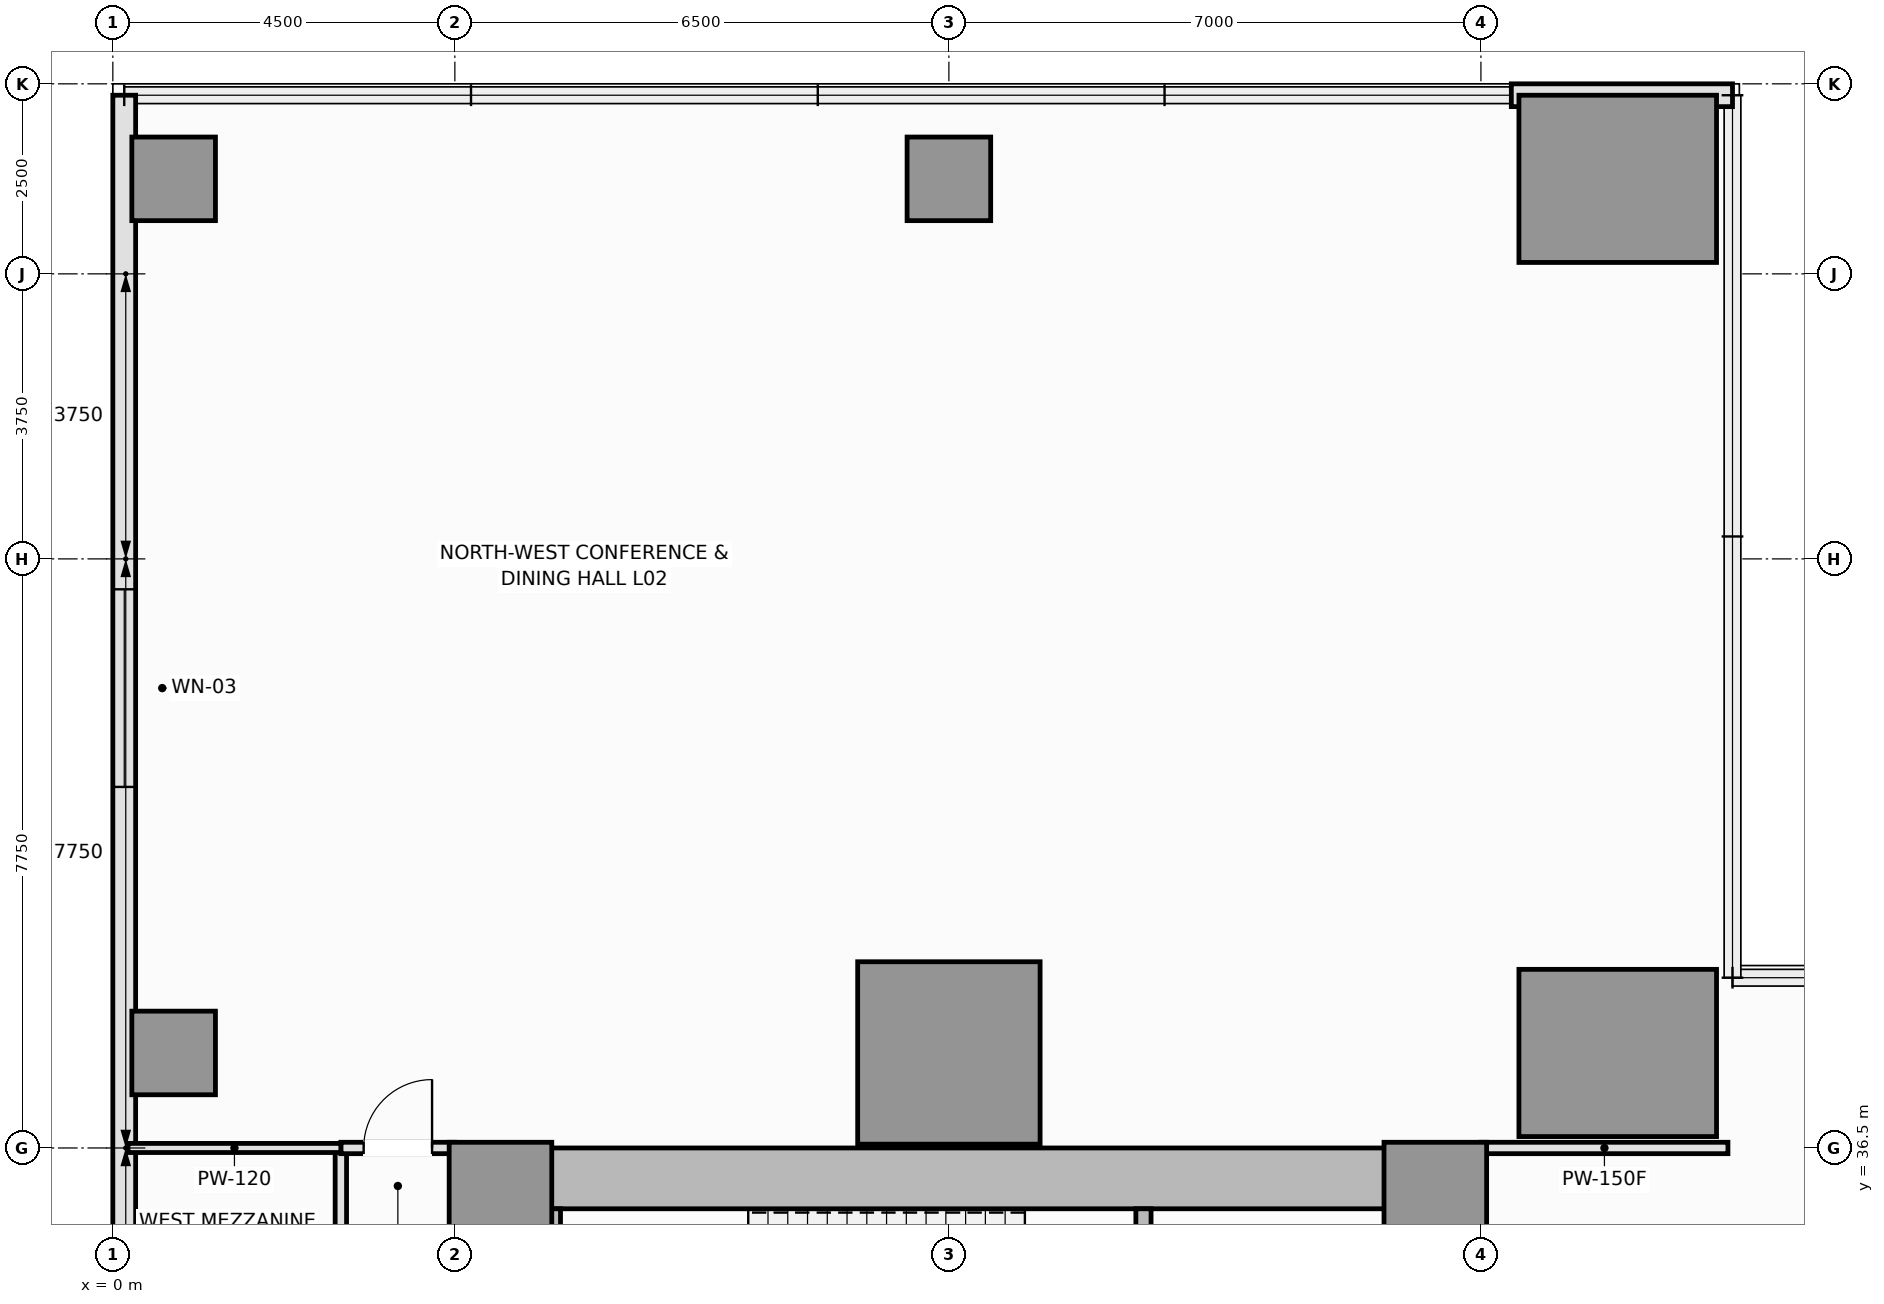
"""IFC4 building model, lengths in metres.
Left out: names, types, materials, properties, quantities, classifications, styles, units other than length and angle.
Written with IfcOpenShell. Run it as: python <this file> out.ifc"""

import sys

from ifc_helpers import new_model, si_unit, direction, frame, frame_2d, origin, origin_2d, place, context, subcontext, project, spatial, rectangle, extrude, element, fill, save


model = new_model("IFC4")
c1 = context("Model", 3, precision=1e-05, world=origin(), true_north=direction((0.0, 1.0)))
c2 = subcontext(c1, "Body", "Model", "MODEL_VIEW")
j1 = project(units=[si_unit("LENGTHUNIT", "METRE"), si_unit("PLANEANGLEUNIT", "RADIAN")], contexts=[c1])
p1 = place(None, origin())
s1 = spatial("IfcSite", under=j1, at=p1, CompositionType="ELEMENT")
p2 = place(p1, origin())
s2 = spatial("IfcBuilding", under=s1, at=p2, CompositionType="ELEMENT")
p3 = place(p2, frame((0.0, 0.0, 10.8)))
s3 = spatial("IfcBuildingStorey", under=s2, at=p3, CompositionType="ELEMENT", Elevation=10.8)
p4 = place(p3, frame((4.5, 36.1, 0.0), z_axis=(0.0, 0.0, 1.0), x_axis=(1.0, 0.0, 0.0)))
e1 = element("IfcWall", 1, at=p4, inside=s3, PredefinedType="SHEAR", context=c2, shape_type="SweptSolid", body=[
    extrude(rectangle(XDim=13.5, YDim=0.8, at=frame_2d((6.75, 0.0))), origin(), (0.0, 0.0, 1.0), 4.8),
])
p5 = place(p3, frame((4.9, 14.8, 0.0), z_axis=(0.0, 0.0, 1.0), x_axis=(0.0, 1.0, 0.0)))
e2 = element("IfcWall", 2, at=p5, inside=s3, PredefinedType="SHEAR", context=c2, shape_type="SweptSolid", body=[
    extrude(rectangle(XDim=20.9, YDim=0.8, at=frame_2d((10.45, 0.0))), origin(), (0.0, 0.0, 1.0), 4.8),
])
p6 = place(p3, frame((17.6, 27.05, 0.0), z_axis=(0.0, 0.0, 1.0), x_axis=(0.0, 1.0, 0.0)))
e3 = element("IfcWall", 3, at=p6, inside=s3, PredefinedType="SHEAR", context=c2, shape_type="SweptSolid", body=[
    extrude(rectangle(XDim=8.65, YDim=0.8, at=frame_2d((4.325, 0.0))), origin(), (0.0, 0.0, 1.0), 4.8),
])
p7 = place(p6, frame((3.45, 0.0, 0.0)))
e4 = element("IfcOpeningElement", 4, at=p7, cuts=e3, PredefinedType="OPENING", context=c2, shape_type="SweptSolid", body=[
    extrude(rectangle(XDim=1.1, YDim=2.15, at=frame_2d((0.55, 1.075))), frame((0.0, 0.41, 0.0), z_axis=(0.0, -1.0, 0.0), x_axis=(1.0, 0.0, 0.0)), (0.0, 0.0, 1.0), 0.82),
])
for number, where, z_axis, x_axis in (
    (5, (5.1, 35.9, 0.0), (0.0, 0.0, 1.0), (1.0, 0.0, 0.0)),
    (6, (17.4, 35.9, 0.0), (0.0, 0.0, 1.0), (1.0, 0.0, 0.0)),
):
    element("IfcColumn", number, at=place(p3, frame(where, z_axis=z_axis, x_axis=x_axis)), inside=s3, PredefinedType="PILASTER", context=c2, shape_type="SweptSolid", body=[
        extrude(rectangle(XDim=1.35, YDim=1.35, at=origin_2d()), origin(), (0.0, 0.0, 1.0), 4.8),
    ])
p8 = place(p3, frame((11.0, 37.75, 0.0), z_axis=(0.0, 0.0, 1.0), x_axis=(1.0, 0.0, 0.0)))
e7 = element("IfcColumn", 7, at=p8, inside=s3, PredefinedType="COLUMN", context=c2, shape_type="SweptSolid", body=[
    extrude(rectangle(XDim=2.4, YDim=2.4, at=origin_2d()), origin(), (0.0, 0.0, 1.0), 4.8),
])
for number, where, z_axis, x_axis in (
    (8, (19.8, 37.75, 0.0), (0.0, 0.0, 1.0), (1.0, 0.0, 0.0)),
    (9, (19.8, 49.25, 0.0), (0.0, 0.0, 1.0), (1.0, 0.0, 0.0)),
):
    element("IfcColumn", number, at=place(p3, frame(where, z_axis=z_axis, x_axis=x_axis)), inside=s3, PredefinedType="COLUMN", context=c2, shape_type="SweptSolid", body=[
        extrude(rectangle(XDim=2.6, YDim=2.2, at=origin_2d()), origin(), (0.0, 0.0, 1.0), 4.8),
    ])
for number, where, z_axis, x_axis in (
    (10, (0.8, 37.75, 0.0), (0.0, 0.0, 1.0), (1.0, 0.0, 0.0)),
    (11, (0.8, 49.25, 0.0), (0.0, 0.0, 1.0), (1.0, 0.0, 0.0)),
    (12, (11.0, 49.25, 0.0), (0.0, 0.0, 1.0), (1.0, 0.0, 0.0)),
):
    element("IfcColumn", number, at=place(p3, frame(where, z_axis=z_axis, x_axis=x_axis)), inside=s3, PredefinedType="COLUMN", context=c2, shape_type="SweptSolid", body=[
        extrude(rectangle(XDim=1.1, YDim=1.1, at=origin_2d()), origin(), (0.0, 0.0, 1.0), 4.8),
    ])
p9 = place(p3, frame((0.15, 50.35, 0.0), z_axis=(0.0, 0.0, 1.0), x_axis=(0.0, -1.0, 0.0)))
e13 = element("IfcWall", 13, at=p9, inside=s3, PredefinedType="SOLIDWALL", context=c2, shape_type="SweptSolid", body=[
    extrude(rectangle(XDim=50.2, YDim=0.3, at=frame_2d((25.1, 0.0))), origin(), (0.0, 0.0, 1.0), 4.6),
])
p10 = place(p9, frame((6.5, 0.0, 0.9)))
e14 = element("IfcOpeningElement", 14, at=p10, cuts=e13, PredefinedType="OPENING", context=c2, shape_type="SweptSolid", body=[
    extrude(rectangle(XDim=2.6, YDim=2.2, at=frame_2d((1.3, 1.1))), frame((0.0, 0.16, 0.0), z_axis=(0.0, -1.0, 0.0), x_axis=(1.0, 0.0, 0.0)), (0.0, 0.0, 1.0), 0.32),
])
p11 = place(p9, frame((42.0, 0.0, 0.9)))
e15 = element("IfcOpeningElement", 15, at=p11, cuts=e13, PredefinedType="OPENING", context=c2, shape_type="SweptSolid", body=[
    extrude(rectangle(XDim=2.6, YDim=2.2, at=frame_2d((1.3, 1.1))), frame((0.0, 0.16, 0.0), z_axis=(0.0, -1.0, 0.0), x_axis=(1.0, 0.0, 0.0)), (0.0, 0.0, 1.0), 0.32),
])
p12 = place(p3, frame((21.31, 50.35, 0.0), z_axis=(0.0, 0.0, 1.0), x_axis=(-1.0, 0.0, 0.0)))
e16 = element("IfcWall", 16, at=p12, inside=s3, PredefinedType="SOLIDWALL", context=c2, shape_type="SweptSolid", body=[
    extrude(rectangle(XDim=2.91, YDim=0.3, at=frame_2d((1.455, 0.0))), origin(), (0.0, 0.0, 1.0), 4.6),
])
p13 = place(p3, frame((5.79, 32.65, 0.0), z_axis=(0.0, 0.0, 1.0), x_axis=(0.0, 1.0, 0.0)))
e17 = element("IfcWall", 17, at=p13, inside=s3, PredefinedType="SOLIDWALL", context=c2, shape_type="SweptSolid", body=[
    extrude(rectangle(XDim=3.05, YDim=0.2, at=frame_2d((1.525, 0.0))), origin(), (0.0, 0.0, 1.0), 4.8),
])
p14 = place(p3, frame((13.56, 32.65, 0.0), z_axis=(0.0, 0.0, 1.0), x_axis=(0.0, 1.0, 0.0)))
e18 = element("IfcWall", 18, at=p14, inside=s3, PredefinedType="SOLIDWALL", context=c2, shape_type="SweptSolid", body=[
    extrude(rectangle(XDim=3.05, YDim=0.2, at=frame_2d((1.525, 0.0))), origin(), (0.0, 0.0, 1.0), 4.8),
])
p15 = place(p14, frame((0.95, 0.0, 0.0)))
e19 = element("IfcOpeningElement", 19, at=p15, cuts=e18, PredefinedType="OPENING", context=c2, shape_type="SweptSolid", body=[
    extrude(rectangle(XDim=1.15, YDim=2.15, at=frame_2d((0.575, 1.075))), frame((0.0, 0.11, 0.0), z_axis=(0.0, -1.0, 0.0), x_axis=(1.0, 0.0, 0.0)), (0.0, 0.0, 1.0), 0.22),
])
p16 = place(p3, frame((18.0, 36.5, 0.0), z_axis=(0.0, 0.0, 1.0), x_axis=(1.0, 0.0, 0.0)))
e20 = element("IfcWall", 20, at=p16, inside=s3, PredefinedType="PARTITIONING", context=c2, shape_type="SweptSolid", body=[
    extrude(rectangle(XDim=3.25, YDim=0.15, at=frame_2d((1.625, 0.0))), origin(), (0.0, 0.0, 1.0), 4.6),
])
p17 = place(p3, frame((3.0, 25.25, 0.0), z_axis=(0.0, 0.0, 1.0), x_axis=(0.0, 1.0, 0.0)))
e21 = element("IfcWall", 21, at=p17, inside=s3, PredefinedType="PARTITIONING", context=c2, shape_type="SweptSolid", body=[
    extrude(rectangle(XDim=11.25, YDim=0.15, at=frame_2d((5.625, 0.0))), origin(), (0.0, 0.0, 1.0), 4.6),
])
p18 = place(p17, frame((5.125, 0.0, 0.0)))
e22 = element("IfcOpeningElement", 22, at=p18, cuts=e21, PredefinedType="OPENING", context=c2, shape_type="SweptSolid", body=[
    extrude(rectangle(XDim=1.0, YDim=2.15, at=frame_2d((0.5, 1.075))), frame((0.0, 0.085, 0.0), z_axis=(0.0, -1.0, 0.0), x_axis=(1.0, 0.0, 0.0)), (0.0, 0.0, 1.0), 0.17),
])
p19 = place(p3, frame((3.0, 36.5, 0.0), z_axis=(0.0, 0.0, 1.0), x_axis=(1.0, 0.0, 0.0)))
e23 = element("IfcWall", 23, at=p19, inside=s3, PredefinedType="PARTITIONING", context=c2, shape_type="SweptSolid", body=[
    extrude(rectangle(XDim=1.5, YDim=0.15, at=frame_2d((0.75, 0.0))), origin(), (0.0, 0.0, 1.0), 4.6),
])
p20 = place(p19, frame((0.3, 0.0, 0.0)))
e24 = element("IfcOpeningElement", 24, at=p20, cuts=e23, PredefinedType="OPENING", context=c2, shape_type="SweptSolid", body=[
    extrude(rectangle(XDim=0.9, YDim=2.1, at=frame_2d((0.45, 1.05))), frame((0.0, 0.085, 0.0), z_axis=(0.0, -1.0, 0.0), x_axis=(1.0, 0.0, 0.0)), (0.0, 0.0, 1.0), 0.17),
])
p21 = place(p3, frame((0.2, 36.5, 0.0), z_axis=(0.0, 0.0, 1.0), x_axis=(1.0, 0.0, 0.0)))
e25 = element("IfcWall", 25, at=p21, inside=s3, PredefinedType="PARTITIONING", context=c2, shape_type="SweptSolid", body=[
    extrude(rectangle(XDim=2.8, YDim=0.12, at=frame_2d((1.4, 0.0))), origin(), (0.0, 0.0, 1.0), 4.6),
])
p22 = place(p10, origin())
e26 = element("IfcWindow", 26, at=p22, inside=s3, PartitioningType="SINGLE_PANEL", PredefinedType="WINDOW", context=c2, shape_type="SweptSolid", body=[
    extrude(rectangle(XDim=2.6, YDim=2.2, at=frame_2d((1.3, 1.1))), frame((0.0, 0.03, 0.0), z_axis=(0.0, -1.0, 0.0), x_axis=(1.0, 0.0, 0.0)), (0.0, 0.0, 1.0), 0.06),
])
fill(e14, e26)
p23 = place(p20, origin())
e27 = element("IfcDoor", 27, at=p23, inside=s3, OperationType="SINGLE_SWING_RIGHT", PredefinedType="DOOR", context=c2, shape_type="SweptSolid", body=[
    extrude(rectangle(XDim=0.9, YDim=2.1, at=frame_2d((0.45, 1.05))), frame((0.0, 0.025, 0.0), z_axis=(0.0, -1.0, 0.0), x_axis=(1.0, 0.0, 0.0)), (0.0, 0.0, 1.0), 0.05),
])
fill(e24, e27)
save(model, sys.argv[1])
